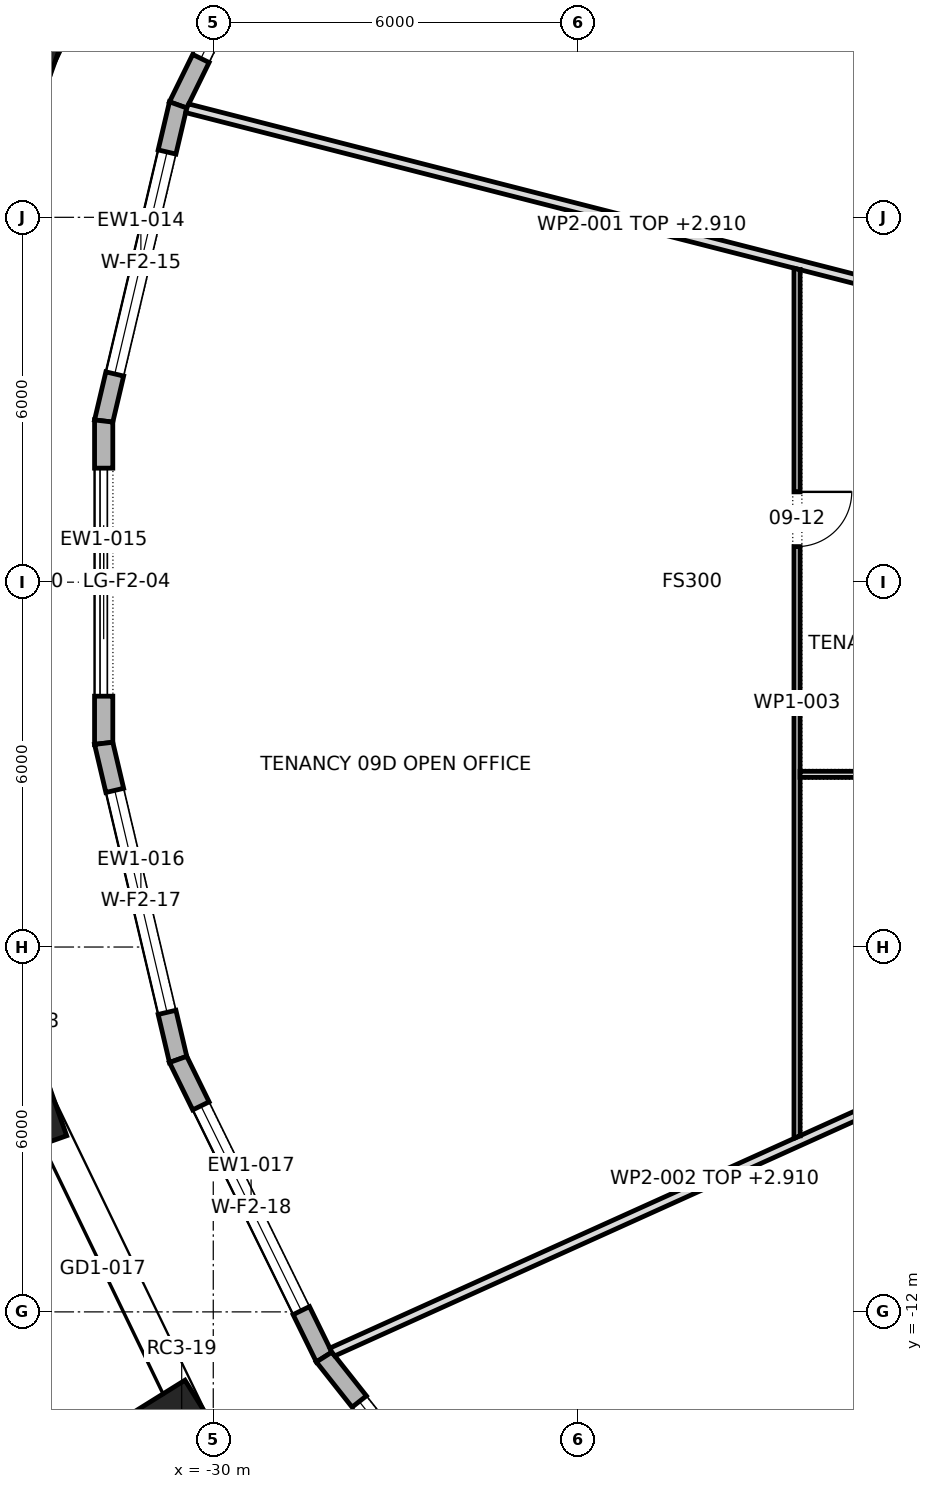
"""IFC4 building model, lengths in metres.
Left out: names, types, materials, properties, quantities, classifications, styles, units other than length and angle.
Written with IfcOpenShell. Run it as: python <this file> out.ifc"""

import sys

from ifc_helpers import new_model, si_unit, direction, frame, frame_2d, origin, origin_2d, place, context, subcontext, project, spatial, polyline, rectangle, outline, extrude, element, fill, save


model = new_model("IFC4")
c1 = context("Model", 3, precision=1e-05, world=origin(), true_north=direction((0.0, 1.0)))
c2 = subcontext(c1, "Body", "Model", "MODEL_VIEW")
j1 = project(units=[si_unit("LENGTHUNIT", "METRE"), si_unit("PLANEANGLEUNIT", "RADIAN")], contexts=[c1])
p1 = place(None, origin())
s1 = spatial("IfcSite", under=j1, at=p1, CompositionType="ELEMENT")
p2 = place(p1, origin())
s2 = spatial("IfcBuilding", under=s1, at=p2, CompositionType="ELEMENT")
p3 = place(p2, frame((0.0, 0.0, 129.7)))
s3 = spatial("IfcBuildingStorey", under=s2, at=p3, CompositionType="ELEMENT", Elevation=129.7)
for number, where, z_axis, x_axis in (
    (1, (-33.115, 8.61, 0.0), (0.0, 0.0, 1.0), (-0.334, -0.943, 0.0)),
    (2, (-33.115, -8.61, 0.0), (0.0, 0.0, 1.0), (0.334, -0.943, 0.0)),
    (3, (-30.519, -13.982, 0.0), (0.0, 0.0, 1.0), (0.529, -0.849, 0.0)),
):
    element("IfcColumn", number, at=place(p3, frame(where, z_axis=z_axis, x_axis=x_axis)), inside=s3, PredefinedType="COLUMN", context=c2, shape_type="SweptSolid", body=[
        extrude(rectangle(XDim=1.4, YDim=1.0, at=origin_2d()), origin(), (0.0, 0.0, 1.0), 4.2),
    ])
p4 = place(p3, frame((-28.177, 12.743, 0.0), z_axis=(0.0, 0.0, 1.0), x_axis=(-0.440321465864, -0.897840189956, 0.0)))
e4 = element("IfcWall", 4, at=p4, inside=s3, PredefinedType="STANDARD", context=c2, shape_type="SweptSolid", body=[
    extrude(outline(polyline([(-0.016, -0.15), (5.468, -0.15), (5.435, 0.15), (0.016, 0.15), (-0.016, -0.15)])), origin(), (0.0, 0.0, 1.0), 3.9),
])
p5 = place(p4, frame((0.851, 0.0, 0.6)))
e5 = element("IfcOpeningElement", 5, at=p5, cuts=e4, PredefinedType="OPENING", context=c2, shape_type="SweptSolid", body=[
    extrude(rectangle(XDim=3.75, YDim=2.85, at=frame_2d((1.875, 1.425))), frame((0.0, 0.162, 0.0), z_axis=(0.0, -1.0, 0.0), x_axis=(1.0, 0.0, 0.0)), (0.0, 0.0, 1.0), 0.324),
])
p6 = place(p3, frame((-30.578, 7.848, 0.0), z_axis=(0.0, 0.0, 1.0), x_axis=(-0.229227895667, -0.973372781543, 0.0)))
e6 = element("IfcWall", 6, at=p6, inside=s3, PredefinedType="STANDARD", context=c2, shape_type="SweptSolid", body=[
    extrude(outline(polyline([(-0.017, -0.15), (5.357, -0.15), (5.323, 0.15), (0.017, 0.15), (-0.017, -0.15)])), origin(), (0.0, 0.0, 1.0), 3.9),
])
p7 = place(p6, frame((0.795, 0.0, 0.6)))
e7 = element("IfcOpeningElement", 7, at=p7, cuts=e6, PredefinedType="OPENING", context=c2, shape_type="SweptSolid", body=[
    extrude(rectangle(XDim=3.75, YDim=2.85, at=frame_2d((1.875, 1.425))), frame((0.0, 0.162, 0.0), z_axis=(0.0, -1.0, 0.0), x_axis=(1.0, 0.0, 0.0)), (0.0, 0.0, 1.0), 0.324),
])
p8 = place(p3, frame((-31.802, 2.65, 0.0), z_axis=(0.0, 0.0, 1.0), x_axis=(0.0, -1.0, 0.0)))
e8 = element("IfcWall", 8, at=p8, inside=s3, PredefinedType="STANDARD", context=c2, shape_type="SweptSolid", body=[
    extrude(outline(polyline([(-0.017, -0.15), (5.318, -0.15), (5.283, 0.15), (0.017, 0.15), (-0.017, -0.15)])), origin(), (0.0, 0.0, 1.0), 3.9),
])
p9 = place(p8, frame((0.775, 0.0, 0.0)))
e9 = element("IfcOpeningElement", 9, at=p9, cuts=e8, PredefinedType="OPENING", context=c2, shape_type="SweptSolid", body=[
    extrude(rectangle(XDim=3.75, YDim=3.45, at=frame_2d((1.875, 1.725))), frame((0.0, 0.162, 0.0), z_axis=(0.0, -1.0, 0.0), x_axis=(1.0, 0.0, 0.0)), (0.0, 0.0, 1.0), 0.324),
])
p10 = place(p3, frame((-31.802, -2.65, 0.0), z_axis=(0.0, 0.0, 1.0), x_axis=(0.229227895667, -0.973372781543, 0.0)))
e10 = element("IfcWall", 10, at=p10, inside=s3, PredefinedType="STANDARD", context=c2, shape_type="SweptSolid", body=[
    extrude(outline(polyline([(-0.017, -0.15), (5.357, -0.15), (5.323, 0.15), (0.017, 0.15), (-0.017, -0.15)])), origin(), (0.0, 0.0, 1.0), 3.9),
])
p11 = place(p10, frame((0.795, 0.0, 0.6)))
e11 = element("IfcOpeningElement", 11, at=p11, cuts=e10, PredefinedType="OPENING", context=c2, shape_type="SweptSolid", body=[
    extrude(rectangle(XDim=3.75, YDim=2.85, at=frame_2d((1.875, 1.425))), frame((0.0, 0.162, 0.0), z_axis=(0.0, -1.0, 0.0), x_axis=(1.0, 0.0, 0.0)), (0.0, 0.0, 1.0), 0.324),
])
p12 = place(p3, frame((-30.578, -7.848, 0.0), z_axis=(0.0, 0.0, 1.0), x_axis=(0.440321465864, -0.897840189956, 0.0)))
e12 = element("IfcWall", 12, at=p12, inside=s3, PredefinedType="STANDARD", context=c2, shape_type="SweptSolid", body=[
    extrude(outline(polyline([(-0.017, -0.15), (5.468, -0.15), (5.435, 0.15), (0.017, 0.15), (-0.017, -0.15)])), origin(), (0.0, 0.0, 1.0), 3.9),
])
p13 = place(p12, frame((0.851, 0.0, 0.6)))
e13 = element("IfcOpeningElement", 13, at=p13, cuts=e12, PredefinedType="OPENING", context=c2, shape_type="SweptSolid", body=[
    extrude(rectangle(XDim=3.75, YDim=2.85, at=frame_2d((1.875, 1.425))), frame((0.0, 0.162, 0.0), z_axis=(0.0, -1.0, 0.0), x_axis=(1.0, 0.0, 0.0)), (0.0, 0.0, 1.0), 0.324),
])
p14 = place(p3, frame((-28.177, -12.743, 0.0), z_axis=(0.0, 0.0, 1.0), x_axis=(0.620464552431, -0.784234492468, 0.0)))
e14 = element("IfcWall", 14, at=p14, inside=s3, PredefinedType="STANDARD", context=c2, shape_type="SweptSolid", body=[
    extrude(outline(polyline([(-0.016, -0.15), (5.629, -0.15), (5.599, 0.15), (0.016, 0.15), (-0.016, -0.15)])), origin(), (0.0, 0.0, 1.0), 3.9),
])
p15 = place(p14, frame((0.932, 0.0, 0.6)))
e15 = element("IfcOpeningElement", 15, at=p15, cuts=e14, PredefinedType="OPENING", context=c2, shape_type="SweptSolid", body=[
    extrude(rectangle(XDim=3.75, YDim=2.85, at=frame_2d((1.875, 1.425))), frame((0.0, 0.162, 0.0), z_axis=(0.0, -1.0, 0.0), x_axis=(1.0, 0.0, 0.0)), (0.0, 0.0, 1.0), 0.324),
])
p16 = place(p3, frame((-30.435, 7.795, 0.0), z_axis=(0.0, 0.0, 1.0), x_axis=(0.968826155352, -0.247741560312, 0.0)))
e16 = element("IfcWall", 16, at=p16, inside=s3, PredefinedType="PARTITIONING", context=c2, shape_type="SweptSolid", body=[
    extrude(outline(polyline([(0.0, -0.075), (1.737, -0.075), (3.474, -0.075), (5.211, -0.075), (6.948, -0.075), (8.685, -0.075), (10.422, -0.075), (10.428, -0.073), (10.428, -0.075), (12.106, -0.075), (13.783, -0.075), (15.46, -0.075), (15.46, -0.073), (15.422, 0.075), (13.496, 0.075), (11.57, 0.075), (9.644, 0.075), (7.718, 0.075), (5.792, 0.075), (3.866, 0.075), (1.939, 0.075), (0.013, 0.075), (0.0, 0.01), (0.0, -0.075)])), origin(), (0.0, 0.0, 1.0), 2.91),
])
p17 = place(p3, frame((-28.052, -12.664, 0.0), z_axis=(0.0, 0.0, 1.0), x_axis=(0.911350334726, 0.411631591833, 0.0)))
e17 = element("IfcWall", 17, at=p17, inside=s3, PredefinedType="PARTITIONING", context=c2, shape_type="SweptSolid", body=[
    extrude(outline(polyline([(0.021, -0.075), (1.985, -0.075), (3.948, -0.075), (5.912, -0.075), (7.875, -0.075), (9.839, -0.075), (11.802, -0.075), (13.766, -0.075), (13.814, 0.031), (13.827, 0.025), (13.85, 0.074), (13.85, 0.075), (12.061, 0.075), (10.273, 0.075), (8.485, 0.075), (8.484, 0.073), (8.481, 0.075), (6.785, 0.075), (5.089, 0.075), (3.392, 0.075), (1.696, 0.075), (0.0, 0.075), (0.0, 0.074), (0.002, 0.001), (0.021, -0.075)])), origin(), (0.0, 0.0, 1.0), 2.91),
])
p18 = place(p3, frame((-20.4, -9.148, 0.0), z_axis=(0.0, 0.0, 1.0), x_axis=(0.0, 1.0, 0.0)))
e18 = element("IfcWall", 18, at=p18, inside=s3, PredefinedType="PARTITIONING", context=c2, shape_type="SweptSolid", body=[
    extrude(outline(polyline([(0.045, -0.05), (2.01, -0.05), (3.974, -0.05), (5.938, -0.05), (5.938, -0.05), (6.038, -0.05), (6.038, -0.05), (7.688, -0.05), (9.338, -0.05), (10.988, -0.05), (12.637, -0.05), (14.287, -0.05), (14.312, 0.049), (14.312, 0.05), (12.523, 0.05), (10.734, 0.05), (8.945, 0.05), (7.156, 0.05), (5.367, 0.05), (3.578, 0.05), (1.789, 0.05), (0.0, 0.05), (0.0, 0.05), (0.045, -0.05)])), origin(), (0.0, 0.0, 1.0), 3.9),
])
p19 = place(p18, frame((9.733, 0.0, 0.0)))
e19 = element("IfcOpeningElement", 19, at=p19, cuts=e18, PredefinedType="OPENING", context=c2, shape_type="SweptSolid", body=[
    extrude(rectangle(XDim=0.9, YDim=2.1, at=frame_2d((0.45, 1.05))), frame((0.0, 0.062, 0.0), z_axis=(0.0, -1.0, 0.0), x_axis=(1.0, 0.0, 0.0)), (0.0, 0.0, 1.0), 0.124),
])
p20 = place(p3, frame((-20.35, -3.16, 0.0), z_axis=(0.0, 0.0, 1.0), x_axis=(1.0, 0.0, 0.0)))
e20 = element("IfcWall", 20, at=p20, inside=s3, PredefinedType="PARTITIONING", context=c2, shape_type="SweptSolid", body=[
    extrude(outline(polyline([(4.89, -0.05), (4.89, 0.0), (4.875, 0.0), (4.875, 0.05), (3.25, 0.05), (1.625, 0.05), (0.0, 0.05), (0.0, -0.05), (1.63, -0.05), (3.26, -0.05), (4.89, -0.05)])), origin(), (0.0, 0.0, 1.0), 3.9),
])
p21 = place(p5, origin())
e21 = element("IfcWindow", 21, at=p21, inside=s3, PartitioningType="TRIPLE_PANEL_VERTICAL", PredefinedType="WINDOW", context=c2, shape_type="SweptSolid", body=[
    extrude(rectangle(XDim=3.75, YDim=2.85, at=frame_2d((1.875, 1.425))), frame((0.0, 0.03, 0.0), z_axis=(0.0, -1.0, 0.0), x_axis=(1.0, 0.0, 0.0)), (0.0, 0.0, 1.0), 0.06),
])
fill(e5, e21)
p22 = place(p7, origin())
e22 = element("IfcWindow", 22, at=p22, inside=s3, PartitioningType="TRIPLE_PANEL_VERTICAL", PredefinedType="WINDOW", context=c2, shape_type="SweptSolid", body=[
    extrude(rectangle(XDim=3.75, YDim=2.85, at=frame_2d((1.875, 1.425))), frame((0.0, 0.03, 0.0), z_axis=(0.0, -1.0, 0.0), x_axis=(1.0, 0.0, 0.0)), (0.0, 0.0, 1.0), 0.06),
])
fill(e7, e22)
p23 = place(p9, origin())
e23 = element("IfcDoor", 23, at=p23, inside=s3, OperationType="DOUBLE_DOOR_SLIDING", PredefinedType="DOOR", context=c2, shape_type="SweptSolid", body=[
    extrude(rectangle(XDim=3.75, YDim=3.45, at=frame_2d((1.875, 1.725))), frame((0.0, 0.025, 0.0), z_axis=(0.0, -1.0, 0.0), x_axis=(1.0, 0.0, 0.0)), (0.0, 0.0, 1.0), 0.05),
])
fill(e9, e23)
p24 = place(p11, origin())
e24 = element("IfcWindow", 24, at=p24, inside=s3, PartitioningType="TRIPLE_PANEL_VERTICAL", PredefinedType="WINDOW", context=c2, shape_type="SweptSolid", body=[
    extrude(rectangle(XDim=3.75, YDim=2.85, at=frame_2d((1.875, 1.425))), frame((0.0, 0.03, 0.0), z_axis=(0.0, -1.0, 0.0), x_axis=(1.0, 0.0, 0.0)), (0.0, 0.0, 1.0), 0.06),
])
fill(e11, e24)
p25 = place(p13, origin())
e25 = element("IfcWindow", 25, at=p25, inside=s3, PartitioningType="TRIPLE_PANEL_VERTICAL", PredefinedType="WINDOW", context=c2, shape_type="SweptSolid", body=[
    extrude(rectangle(XDim=3.75, YDim=2.85, at=frame_2d((1.875, 1.425))), frame((0.0, 0.03, 0.0), z_axis=(0.0, -1.0, 0.0), x_axis=(1.0, 0.0, 0.0)), (0.0, 0.0, 1.0), 0.06),
])
fill(e13, e25)
p26 = place(p15, origin())
e26 = element("IfcWindow", 26, at=p26, inside=s3, PartitioningType="TRIPLE_PANEL_VERTICAL", PredefinedType="WINDOW", context=c2, shape_type="SweptSolid", body=[
    extrude(rectangle(XDim=3.75, YDim=2.85, at=frame_2d((1.875, 1.425))), frame((0.0, 0.03, 0.0), z_axis=(0.0, -1.0, 0.0), x_axis=(1.0, 0.0, 0.0)), (0.0, 0.0, 1.0), 0.06),
])
fill(e15, e26)
p27 = place(p19, frame((0.9, 0.0, 0.0), z_axis=(0.0, 0.0, 1.0), x_axis=(-1.0, 0.0, 0.0)))
e27 = element("IfcDoor", 27, at=p27, inside=s3, OperationType="SINGLE_SWING_RIGHT", PredefinedType="DOOR", context=c2, shape_type="SweptSolid", body=[
    extrude(rectangle(XDim=0.9, YDim=2.1, at=frame_2d((0.45, 1.05))), frame((0.0, 0.025, 0.0), z_axis=(0.0, -1.0, 0.0), x_axis=(1.0, 0.0, 0.0)), (0.0, 0.0, 1.0), 0.05),
])
fill(e19, e27)
save(model, sys.argv[1])
